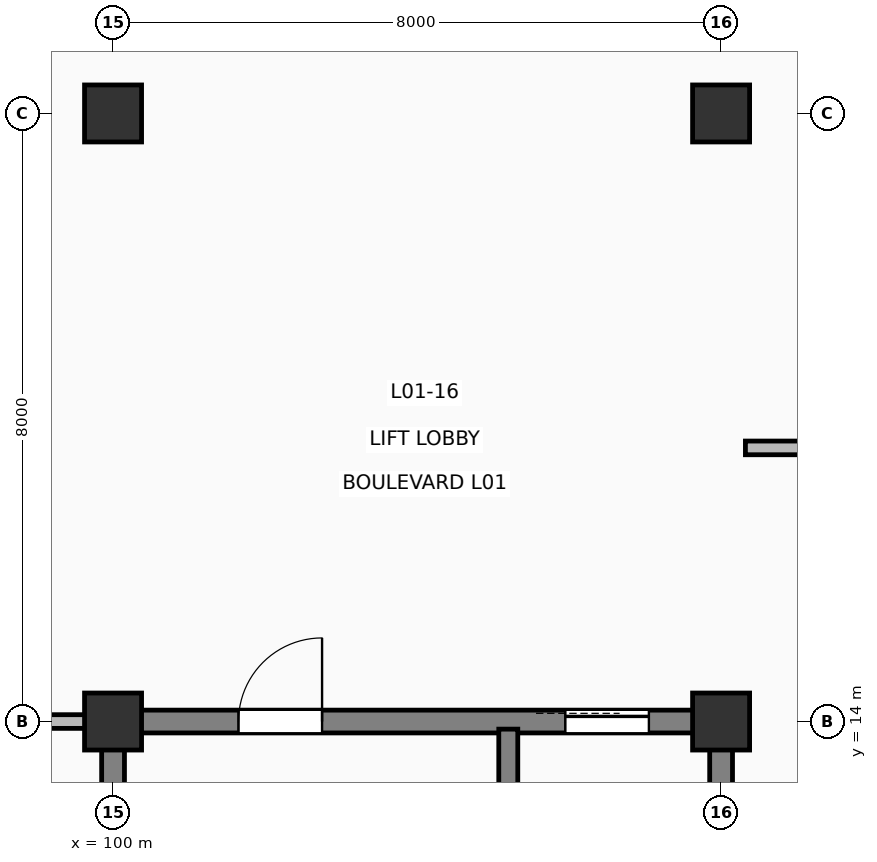
"""IFC4 building model, lengths in metres.
Left out: names, types, materials, properties, quantities, classifications, styles, units other than length and angle.
Written with IfcOpenShell. Run it as: python <this file> out.ifc"""

import sys

from ifc_helpers import new_model, si_unit, direction, frame, frame_2d, origin, origin_2d, place, context, subcontext, project, spatial, rectangle, extrude, element, fill, save


model = new_model("IFC4")
c1 = context("Model", 3, precision=1e-05, world=origin(), true_north=direction((0.0, 1.0)))
c2 = subcontext(c1, "Body", "Model", "MODEL_VIEW")
j1 = project(units=[si_unit("LENGTHUNIT", "METRE"), si_unit("PLANEANGLEUNIT", "RADIAN")], contexts=[c1])
p1 = place(None, origin())
s1 = spatial("IfcSite", under=j1, at=p1, CompositionType="ELEMENT")
p2 = place(p1, origin())
s2 = spatial("IfcBuilding", under=s1, at=p2, CompositionType="ELEMENT")
p3 = place(p2, frame((0.0, 0.0, 5.4)))
s3 = spatial("IfcBuildingStorey", under=s2, at=p3, CompositionType="ELEMENT", Elevation=5.4)
for number, where, z_axis, x_axis in (
    (1, (100.0, 14.0, 0.0), (0.0, 0.0, 1.0), (1.0, 0.0, 0.0)),
    (2, (100.0, 22.0, 0.0), (0.0, 0.0, 1.0), (1.0, 0.0, 0.0)),
    (3, (108.0, 14.0, 0.0), (0.0, 0.0, 1.0), (1.0, 0.0, 0.0)),
    (4, (108.0, 22.0, 0.0), (0.0, 0.0, 1.0), (1.0, 0.0, 0.0)),
):
    element("IfcColumn", number, at=place(p3, frame(where, z_axis=z_axis, x_axis=x_axis)), inside=s3, PredefinedType="COLUMN", context=c2, shape_type="SweptSolid", body=[
        extrude(rectangle(XDim=0.75, YDim=0.75, at=origin_2d()), origin(), (0.0, 0.0, 1.0), 4.2),
    ])
p4 = place(p3, frame((100.0, 6.0, 0.0), z_axis=(0.0, 0.0, 1.0), x_axis=(0.0, 1.0, 0.0)))
e5 = element("IfcWall", 5, at=p4, inside=s3, PredefinedType="SHEAR", context=c2, shape_type="SweptSolid", body=[
    extrude(rectangle(XDim=8.0, YDim=0.3, at=frame_2d((4.0, 0.0))), origin(), (0.0, 0.0, 1.0), 4.2),
])
p5 = place(p3, frame((100.0, 14.0, 0.0), z_axis=(0.0, 0.0, 1.0), x_axis=(1.0, 0.0, 0.0)))
e6 = element("IfcWall", 6, at=p5, inside=s3, PredefinedType="SHEAR", context=c2, shape_type="SweptSolid", body=[
    extrude(rectangle(XDim=8.0, YDim=0.3, at=frame_2d((4.0, 0.0))), origin(), (0.0, 0.0, 1.0), 4.2),
])
p6 = place(p5, frame((1.65, 0.0, 0.0)))
e7 = element("IfcOpeningElement", 7, at=p6, cuts=e6, PredefinedType="OPENING", context=c2, shape_type="SweptSolid", body=[
    extrude(rectangle(XDim=1.1, YDim=2.2, at=frame_2d((0.55, 1.1))), frame((0.0, 0.16, 0.0), z_axis=(0.0, -1.0, 0.0), x_axis=(1.0, 0.0, 0.0)), (0.0, 0.0, 1.0), 0.32),
])
p7 = place(p5, frame((5.95, 0.0, 0.0)))
e8 = element("IfcOpeningElement", 8, at=p7, cuts=e6, PredefinedType="OPENING", context=c2, shape_type="SweptSolid", body=[
    extrude(rectangle(XDim=1.1, YDim=2.2, at=frame_2d((0.55, 1.1))), frame((0.0, 0.16, 0.0), z_axis=(0.0, -1.0, 0.0), x_axis=(1.0, 0.0, 0.0)), (0.0, 0.0, 1.0), 0.32),
])
p8 = place(p3, frame((108.0, 14.0, 0.0), z_axis=(0.0, 0.0, 1.0), x_axis=(0.0, -1.0, 0.0)))
e9 = element("IfcWall", 9, at=p8, inside=s3, PredefinedType="SHEAR", context=c2, shape_type="SweptSolid", body=[
    extrude(rectangle(XDim=8.0, YDim=0.3, at=frame_2d((4.0, 0.0))), origin(), (0.0, 0.0, 1.0), 4.2),
])
p9 = place(p3, frame((105.2, 6.1, 0.0), z_axis=(0.0, 0.0, 1.0), x_axis=(0.0, 1.0, 0.0)))
e10 = element("IfcWall", 10, at=p9, inside=s3, PredefinedType="SHEAR", context=c2, shape_type="SweptSolid", body=[
    extrude(rectangle(XDim=7.8, YDim=0.25, at=frame_2d((3.9, 0.0))), origin(), (0.0, 0.0, 1.0), 4.2),
])
p10 = place(p3, frame((99.68, 14.0, 0.0), z_axis=(0.0, 0.0, 1.0), x_axis=(-1.0, 0.0, 0.0)))
e11 = element("IfcWall", 11, at=p10, inside=s3, PredefinedType="PARTITIONING", context=c2, shape_type="SweptSolid", body=[
    extrude(rectangle(XDim=10.32, YDim=0.18, at=frame_2d((5.16, 0.0))), origin(), (0.0, 0.0, 1.0), 3.165),
])
p11 = place(p10, frame((4.66, 0.0, 0.0)))
e12 = element("IfcOpeningElement", 12, at=p11, cuts=e11, PredefinedType="OPENING", context=c2, shape_type="SweptSolid", body=[
    extrude(rectangle(XDim=1.0, YDim=2.15, at=frame_2d((0.5, 1.075))), frame((0.0, 0.1, 0.0), z_axis=(0.0, -1.0, 0.0), x_axis=(1.0, 0.0, 0.0)), (0.0, 0.0, 1.0), 0.2),
])
p12 = place(p3, frame((123.68, 17.6, 0.0), z_axis=(0.0, 0.0, 1.0), x_axis=(-1.0, 0.0, 0.0)))
e13 = element("IfcWall", 13, at=p12, inside=s3, PredefinedType="PARTITIONING", context=c2, shape_type="SweptSolid", body=[
    extrude(rectangle(XDim=15.36, YDim=0.18, at=frame_2d((7.68, 0.0))), origin(), (0.0, 0.0, 1.0), 3.98),
])
p13 = place(p12, frame((7.18, 0.0, 0.0)))
e14 = element("IfcOpeningElement", 14, at=p13, cuts=e13, PredefinedType="OPENING", context=c2, shape_type="SweptSolid", body=[
    extrude(rectangle(XDim=1.0, YDim=2.15, at=frame_2d((0.5, 1.075))), frame((0.0, 0.1, 0.0), z_axis=(0.0, -1.0, 0.0), x_axis=(1.0, 0.0, 0.0)), (0.0, 0.0, 1.0), 0.2),
])
p14 = place(p6, origin())
e15 = element("IfcDoor", 15, at=p14, inside=s3, OperationType="SINGLE_SWING_RIGHT", PredefinedType="DOOR", context=c2, shape_type="SweptSolid", body=[
    extrude(rectangle(XDim=1.1, YDim=2.2, at=frame_2d((0.55, 1.1))), frame((0.0, 0.025, 0.0), z_axis=(0.0, -1.0, 0.0), x_axis=(1.0, 0.0, 0.0)), (0.0, 0.0, 1.0), 0.05),
])
fill(e7, e15)
p15 = place(p7, origin())
e16 = element("IfcDoor", 16, at=p15, inside=s3, OperationType="SLIDING_TO_LEFT", PredefinedType="DOOR", context=c2, shape_type="SweptSolid", body=[
    extrude(rectangle(XDim=1.1, YDim=2.2, at=frame_2d((0.55, 1.1))), frame((0.0, 0.025, 0.0), z_axis=(0.0, -1.0, 0.0), x_axis=(1.0, 0.0, 0.0)), (0.0, 0.0, 1.0), 0.05),
])
fill(e8, e16)
save(model, sys.argv[1])
